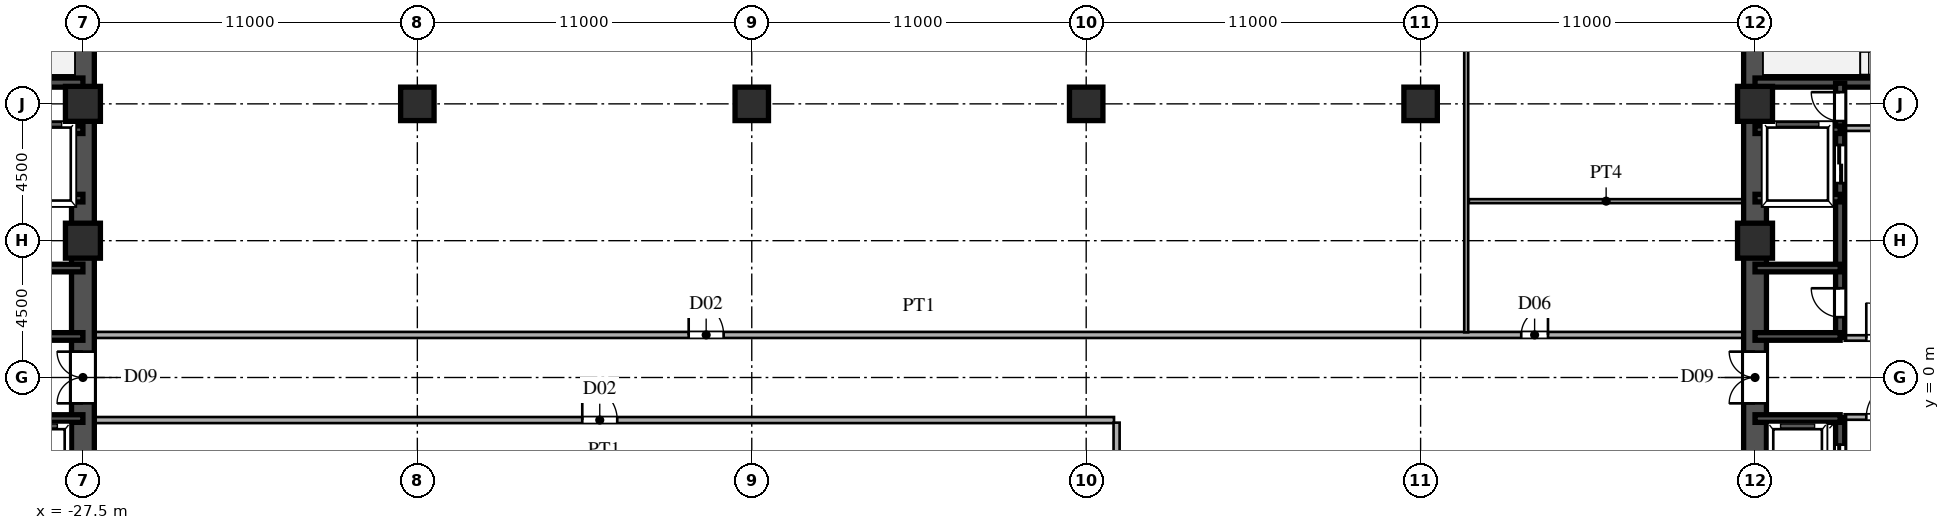
"""IFC4 building model, lengths in metres.
Left out: names, types, materials, properties, quantities, classifications, styles, units other than length and angle.
Written with IfcOpenShell. Run it as: python <this file> out.ifc"""

import sys

from ifc_helpers import new_model, si_unit, direction, frame, frame_2d, origin, origin_2d, place, context, subcontext, project, spatial, rectangle, hollow_rectangle, extrude, source, transform, mapped, element, fill, save


model = new_model("IFC4")
c1 = context("Model", 3, precision=1e-05, world=origin(), true_north=direction((0.0, 1.0)))
c2 = subcontext(c1, "Body", "Model", "MODEL_VIEW")
j1 = project(units=[si_unit("LENGTHUNIT", "METRE"), si_unit("PLANEANGLEUNIT", "RADIAN")], contexts=[c1])
p1 = place(None, origin())
s1 = spatial("IfcSite", under=j1, at=p1, CompositionType="ELEMENT")
p2 = place(p1, origin())
s2 = spatial("IfcBuilding", under=s1, at=p2, CompositionType="ELEMENT")
p3 = place(p2, frame((0.0, 0.0, -4.8)))
s3 = spatial("IfcBuildingStorey", under=s2, at=p3, CompositionType="ELEMENT", Elevation=-4.8)
m1 = source(origin(), c2, "Body", "SweptSolid", [
    extrude(hollow_rectangle(XDim=1.15, YDim=1.15, WallThickness=0.048, at=origin_2d()), origin(), (0.0, 0.0, 1.0), 4.8),
])
for number, where, z_axis, x_axis in (
    (1, (-27.5, 4.5, 0.0), (0.0, 0.0, 1.0), (1.0, 0.0, 0.0)),
    (2, (-27.5, 9.0, 0.0), (0.0, 0.0, 1.0), (1.0, 0.0, 0.0)),
    (3, (27.5, 4.5, 0.0), (0.0, 0.0, 1.0), (1.0, 0.0, 0.0)),
    (4, (27.5, 9.0, 0.0), (0.0, 0.0, 1.0), (1.0, 0.0, 0.0)),
):
    element("IfcColumn", number, at=place(p3, frame(where, z_axis=z_axis, x_axis=x_axis)), inside=s3, PredefinedType="COLUMN", context=c2, shape_type="MappedRepresentation", body=[
        mapped(m1, transform((0.0, 0.0, 0.0), scale=1.0)),
    ])
m2 = source(origin(), c2, "Body", "SweptSolid", [
    extrude(rectangle(XDim=1.1, YDim=1.1, at=origin_2d()), origin(), (0.0, 0.0, 1.0), 4.8),
])
for number, where, z_axis, x_axis in (
    (5, (-16.5, 9.0, 0.0), (0.0, 0.0, 1.0), (1.0, 0.0, 0.0)),
    (6, (-5.5, 9.0, 0.0), (0.0, 0.0, 1.0), (1.0, 0.0, 0.0)),
    (7, (5.5, 9.0, 0.0), (0.0, 0.0, 1.0), (1.0, 0.0, 0.0)),
    (8, (16.5, 9.0, 0.0), (0.0, 0.0, 1.0), (1.0, 0.0, 0.0)),
):
    element("IfcColumn", number, at=place(p3, frame(where, z_axis=z_axis, x_axis=x_axis)), inside=s3, PredefinedType="COLUMN", context=c2, shape_type="MappedRepresentation", body=[
        mapped(m2, transform((0.0, 0.0, 0.0), scale=1.0)),
    ])
for number, where, z_axis, x_axis in (
    (9, (-27.5, -13.5, 0.0), (0.0, 0.0, 1.0), (0.0, 1.0, 0.0)),
    (10, (-27.5, 1.3, 0.0), (0.0, 0.0, 1.0), (0.0, 1.0, 0.0)),
):
    element("IfcWall", number, at=place(p3, frame(where, z_axis=z_axis, x_axis=x_axis)), inside=s3, PredefinedType="SHEAR", context=c2, shape_type="SweptSolid", body=[
        extrude(rectangle(XDim=12.2, YDim=0.75, at=frame_2d((6.1, 0.0))), origin(), (0.0, 0.0, 1.0), 4.52),
    ])
p4 = place(p3, frame((-27.5, -1.3, 0.0), z_axis=(0.0, 0.0, 1.0), x_axis=(0.0, 1.0, 0.0)))
e11 = element("IfcWall", 11, at=p4, inside=s3, PredefinedType="SHEAR", context=c2, shape_type="SweptSolid", body=[
    extrude(rectangle(XDim=2.6, YDim=0.75, at=frame_2d((1.3, 0.0))), origin(), (0.0, 0.0, 1.0), 4.52),
])
p5 = place(p4, frame((0.45, 0.0, 0.0)))
e12 = element("IfcOpeningElement", 12, at=p5, cuts=e11, PredefinedType="OPENING", context=c2, shape_type="SweptSolid", body=[
    extrude(rectangle(XDim=1.7, YDim=2.35, at=frame_2d((0.85, 1.175))), frame((0.0, 0.385, 0.0), z_axis=(0.0, -1.0, 0.0), x_axis=(1.0, 0.0, 0.0)), (0.0, 0.0, 1.0), 0.77),
])
p6 = place(p3, frame((-36.5, 9.7, 0.0), z_axis=(0.0, 0.0, 1.0), x_axis=(1.0, 0.0, 0.0)))
e13 = element("IfcWall", 13, at=p6, inside=s3, PredefinedType="SHEAR", context=c2, shape_type="SweptSolid", body=[
    extrude(rectangle(XDim=9.0, YDim=0.3, at=frame_2d((4.5, 0.0))), origin(), (0.0, 0.0, 1.0), 4.52),
])
p7 = place(p6, frame((0.6, 0.0, 0.0)))
e14 = element("IfcOpeningElement", 14, at=p7, cuts=e13, PredefinedType="OPENING", context=c2, shape_type="SweptSolid", body=[
    extrude(rectangle(XDim=1.1, YDim=2.2, at=frame_2d((0.55, 1.1))), frame((0.0, 0.16, 0.0), z_axis=(0.0, -1.0, 0.0), x_axis=(1.0, 0.0, 0.0)), (0.0, 0.0, 1.0), 0.32),
])
for number, where, z_axis, x_axis in (
    (15, (-30.3, -1.35, 0.0), (0.0, 0.0, 1.0), (1.0, 0.0, 0.0)),
    (16, (-30.3, 1.35, 0.0), (0.0, 0.0, 1.0), (1.0, 0.0, 0.0)),
    (17, (-30.3, 3.6, 0.0), (0.0, 0.0, 1.0), (1.0, 0.0, 0.0)),
    (18, (-30.3, 5.9, 0.0), (0.0, 0.0, 1.0), (1.0, 0.0, 0.0)),
    (19, (-30.3, 8.15, 0.0), (0.0, 0.0, 1.0), (1.0, 0.0, 0.0)),
):
    element("IfcWall", number, at=place(p3, frame(where, z_axis=z_axis, x_axis=x_axis)), inside=s3, PredefinedType="SHEAR", context=c2, shape_type="SweptSolid", body=[
        extrude(rectangle(XDim=2.8, YDim=0.25, at=frame_2d((1.4, 0.0))), origin(), (0.0, 0.0, 1.0), 4.52),
    ])
for number, where, z_axis, x_axis in (
    (20, (27.5, -13.5, 0.0), (0.0, 0.0, 1.0), (0.0, 1.0, 0.0)),
    (21, (27.5, 1.3, 0.0), (0.0, 0.0, 1.0), (0.0, 1.0, 0.0)),
):
    element("IfcWall", number, at=place(p3, frame(where, z_axis=z_axis, x_axis=x_axis)), inside=s3, PredefinedType="SHEAR", context=c2, shape_type="SweptSolid", body=[
        extrude(rectangle(XDim=12.2, YDim=0.75, at=frame_2d((6.1, 0.0))), origin(), (0.0, 0.0, 1.0), 4.52),
    ])
p8 = place(p3, frame((27.5, -1.3, 0.0), z_axis=(0.0, 0.0, 1.0), x_axis=(0.0, 1.0, 0.0)))
e22 = element("IfcWall", 22, at=p8, inside=s3, PredefinedType="SHEAR", context=c2, shape_type="SweptSolid", body=[
    extrude(rectangle(XDim=2.6, YDim=0.75, at=frame_2d((1.3, 0.0))), origin(), (0.0, 0.0, 1.0), 4.52),
])
p9 = place(p8, frame((0.45, 0.0, 0.0)))
e23 = element("IfcOpeningElement", 23, at=p9, cuts=e22, PredefinedType="OPENING", context=c2, shape_type="SweptSolid", body=[
    extrude(rectangle(XDim=1.7, YDim=2.35, at=frame_2d((0.85, 1.175))), frame((0.0, 0.385, 0.0), z_axis=(0.0, -1.0, 0.0), x_axis=(1.0, 0.0, 0.0)), (0.0, 0.0, 1.0), 0.77),
])
p10 = place(p3, frame((27.5, 9.7, 0.0), z_axis=(0.0, 0.0, 1.0), x_axis=(1.0, 0.0, 0.0)))
e24 = element("IfcWall", 24, at=p10, inside=s3, PredefinedType="SHEAR", context=c2, shape_type="SweptSolid", body=[
    extrude(rectangle(XDim=9.0, YDim=0.3, at=frame_2d((4.5, 0.0))), origin(), (0.0, 0.0, 1.0), 4.52),
])
p11 = place(p10, frame((7.3, 0.0, 0.0)))
e25 = element("IfcOpeningElement", 25, at=p11, cuts=e24, PredefinedType="OPENING", context=c2, shape_type="SweptSolid", body=[
    extrude(rectangle(XDim=1.1, YDim=2.2, at=frame_2d((0.55, 1.1))), frame((0.0, 0.16, 0.0), z_axis=(0.0, -1.0, 0.0), x_axis=(1.0, 0.0, 0.0)), (0.0, 0.0, 1.0), 0.32),
])
for number, where, z_axis, x_axis in (
    (26, (27.5, -1.35, 0.0), (0.0, 0.0, 1.0), (1.0, 0.0, 0.0)),
    (27, (27.5, 1.35, 0.0), (0.0, 0.0, 1.0), (1.0, 0.0, 0.0)),
    (28, (27.5, 3.6, 0.0), (0.0, 0.0, 1.0), (1.0, 0.0, 0.0)),
    (29, (27.5, 5.9, 0.0), (0.0, 0.0, 1.0), (1.0, 0.0, 0.0)),
    (30, (27.5, 8.15, 0.0), (0.0, 0.0, 1.0), (1.0, 0.0, 0.0)),
):
    element("IfcWall", number, at=place(p3, frame(where, z_axis=z_axis, x_axis=x_axis)), inside=s3, PredefinedType="SHEAR", context=c2, shape_type="SweptSolid", body=[
        extrude(rectangle(XDim=2.8, YDim=0.25, at=frame_2d((1.4, 0.0))), origin(), (0.0, 0.0, 1.0), 4.52),
    ])
p12 = place(p3, frame((30.3, -4.2, 0.0), z_axis=(0.0, 0.0, 1.0), x_axis=(0.0, 1.0, 0.0)))
e31 = element("IfcWall", 31, at=p12, inside=s3, PredefinedType="SHEAR", context=c2, shape_type="SweptSolid", body=[
    extrude(rectangle(XDim=2.88, YDim=0.3, at=frame_2d((1.44, 0.0))), origin(), (0.0, 0.0, 1.0), 4.52),
])
p13 = place(p12, frame((0.89, 0.0, 0.0)))
e32 = element("IfcOpeningElement", 32, at=p13, cuts=e31, PredefinedType="OPENING", context=c2, shape_type="SweptSolid", body=[
    extrude(rectangle(XDim=1.1, YDim=2.2, at=frame_2d((0.55, 1.1))), frame((0.0, 0.16, 0.0), z_axis=(0.0, -1.0, 0.0), x_axis=(1.0, 0.0, 0.0)), (0.0, 0.0, 1.0), 0.32),
])
p14 = place(p3, frame((30.3, 1.32, 0.0), z_axis=(0.0, 0.0, 1.0), x_axis=(0.0, 1.0, 0.0)))
e33 = element("IfcWall", 33, at=p14, inside=s3, PredefinedType="SHEAR", context=c2, shape_type="SweptSolid", body=[
    extrude(rectangle(XDim=2.28, YDim=0.3, at=frame_2d((1.14, 0.0))), origin(), (0.0, 0.0, 1.0), 4.52),
])
p15 = place(p14, frame((0.665, 0.0, 0.0)))
e34 = element("IfcOpeningElement", 34, at=p15, cuts=e33, PredefinedType="OPENING", context=c2, shape_type="SweptSolid", body=[
    extrude(rectangle(XDim=0.95, YDim=2.15, at=frame_2d((0.475, 1.075))), frame((0.0, 0.16, 0.0), z_axis=(0.0, -1.0, 0.0), x_axis=(1.0, 0.0, 0.0)), (0.0, 0.0, 1.0), 0.32),
])
p16 = place(p3, frame((30.3, 3.6, 0.0), z_axis=(0.0, 0.0, 1.0), x_axis=(0.0, 1.0, 0.0)))
e35 = element("IfcWall", 35, at=p16, inside=s3, PredefinedType="SHEAR", context=c2, shape_type="SweptSolid", body=[
    extrude(rectangle(XDim=2.3, YDim=0.3, at=frame_2d((1.15, 0.0))), origin(), (0.0, 0.0, 1.0), 4.52),
])
p17 = place(p3, frame((30.3, 5.9, 0.0), z_axis=(0.0, 0.0, 1.0), x_axis=(0.0, 1.0, 0.0)))
e36 = element("IfcWall", 36, at=p17, inside=s3, PredefinedType="SHEAR", context=c2, shape_type="SweptSolid", body=[
    extrude(rectangle(XDim=2.25, YDim=0.3, at=frame_2d((1.125, 0.0))), origin(), (0.0, 0.0, 1.0), 4.52),
])
p18 = place(p17, frame((0.495, 0.0, 0.0)))
e37 = element("IfcOpeningElement", 37, at=p18, cuts=e36, PredefinedType="OPENING", context=c2, shape_type="SweptSolid", body=[
    extrude(rectangle(XDim=1.25, YDim=2.3, at=frame_2d((0.625, 1.15))), frame((0.0, 0.16, 0.0), z_axis=(0.0, -1.0, 0.0), x_axis=(1.0, 0.0, 0.0)), (0.0, 0.0, 1.0), 0.32),
])
p19 = place(p3, frame((30.3, 8.15, 0.0), z_axis=(0.0, 0.0, 1.0), x_axis=(0.0, 1.0, 0.0)))
e38 = element("IfcWall", 38, at=p19, inside=s3, PredefinedType="SHEAR", context=c2, shape_type="SweptSolid", body=[
    extrude(rectangle(XDim=1.53, YDim=0.3, at=frame_2d((0.765, 0.0))), origin(), (0.0, 0.0, 1.0), 4.52),
])
p20 = place(p19, frame((0.285, 0.0, 0.0)))
e39 = element("IfcOpeningElement", 39, at=p20, cuts=e38, PredefinedType="OPENING", context=c2, shape_type="SweptSolid", body=[
    extrude(rectangle(XDim=0.95, YDim=2.15, at=frame_2d((0.475, 1.075))), frame((0.0, 0.16, 0.0), z_axis=(0.0, -1.0, 0.0), x_axis=(1.0, 0.0, 0.0)), (0.0, 0.0, 1.0), 0.32),
])
p21 = place(p3, frame((30.45, 8.2, 0.0), z_axis=(0.0, 0.0, 1.0), x_axis=(1.0, 0.0, 0.0)))
e40 = element("IfcWall", 40, at=p21, inside=s3, PredefinedType="PARTITIONING", context=c2, shape_type="SweptSolid", body=[
    extrude(rectangle(XDim=5.7, YDim=0.18, at=frame_2d((2.85, 0.0))), origin(), (0.0, 0.0, 1.0), 4.52),
])
p22 = place(p3, frame((30.45, -1.3, 0.0), z_axis=(0.0, 0.0, 1.0), x_axis=(1.0, 0.0, 0.0)))
e41 = element("IfcWall", 41, at=p22, inside=s3, PredefinedType="PARTITIONING", context=c2, shape_type="SweptSolid", body=[
    extrude(rectangle(XDim=2.57, YDim=0.18, at=frame_2d((1.285, 0.0))), origin(), (0.0, 0.0, 1.0), 4.52),
])
p23 = place(p22, frame((0.71, 0.0, 0.0)))
e42 = element("IfcOpeningElement", 42, at=p23, cuts=e41, PredefinedType="OPENING", context=c2, shape_type="SweptSolid", body=[
    extrude(rectangle(XDim=1.15, YDim=2.2, at=frame_2d((0.575, 1.1))), frame((0.0, 0.1, 0.0), z_axis=(0.0, -1.0, 0.0), x_axis=(1.0, 0.0, 0.0)), (0.0, 0.0, 1.0), 0.2),
])
p24 = place(p3, frame((30.45, 1.3, 0.0), z_axis=(0.0, 0.0, 1.0), x_axis=(1.0, 0.0, 0.0)))
e43 = element("IfcWall", 43, at=p24, inside=s3, PredefinedType="PARTITIONING", context=c2, shape_type="SweptSolid", body=[
    extrude(rectangle(XDim=2.57, YDim=0.18, at=frame_2d((1.285, 0.0))), origin(), (0.0, 0.0, 1.0), 4.52),
])
p25 = place(p24, frame((0.71, 0.0, 0.0)))
e44 = element("IfcOpeningElement", 44, at=p25, cuts=e43, PredefinedType="OPENING", context=c2, shape_type="SweptSolid", body=[
    extrude(rectangle(XDim=1.15, YDim=2.2, at=frame_2d((0.575, 1.1))), frame((0.0, 0.1, 0.0), z_axis=(0.0, -1.0, 0.0), x_axis=(1.0, 0.0, 0.0)), (0.0, 0.0, 1.0), 0.2),
])
p26 = place(p3, frame((-27.12, -1.4, 0.0), z_axis=(0.0, 0.0, 1.0), x_axis=(1.0, 0.0, 0.0)))
e45 = element("IfcWall", 45, at=p26, inside=s3, PredefinedType="PARTITIONING", context=c2, shape_type="SweptSolid", body=[
    extrude(rectangle(XDim=33.535, YDim=0.2, at=frame_2d((16.768, 0.0))), origin(), (0.0, 0.0, 1.0), 4.52),
])
p27 = place(p26, frame((16.045, 0.0, 0.0)))
e46 = element("IfcOpeningElement", 46, at=p27, cuts=e45, PredefinedType="OPENING", context=c2, shape_type="SweptSolid", body=[
    extrude(rectangle(XDim=1.15, YDim=2.2, at=frame_2d((0.575, 1.1))), frame((0.0, 0.11, 0.0), z_axis=(0.0, -1.0, 0.0), x_axis=(1.0, 0.0, 0.0)), (0.0, 0.0, 1.0), 0.22),
])
p28 = place(p3, frame((-27.12, 1.4, 0.0), z_axis=(0.0, 0.0, 1.0), x_axis=(1.0, 0.0, 0.0)))
e47 = element("IfcWall", 47, at=p28, inside=s3, PredefinedType="PARTITIONING", context=c2, shape_type="SweptSolid", body=[
    extrude(rectangle(XDim=54.24, YDim=0.2, at=frame_2d((27.12, 0.0))), origin(), (0.0, 0.0, 1.0), 4.52),
])
p29 = place(p28, frame((19.545, 0.0, 0.0)))
e48 = element("IfcOpeningElement", 48, at=p29, cuts=e47, PredefinedType="OPENING", context=c2, shape_type="SweptSolid", body=[
    extrude(rectangle(XDim=1.15, YDim=2.2, at=frame_2d((0.575, 1.1))), frame((0.0, 0.11, 0.0), z_axis=(0.0, -1.0, 0.0), x_axis=(1.0, 0.0, 0.0)), (0.0, 0.0, 1.0), 0.22),
])
p30 = place(p28, frame((46.93, 0.0, 0.0)))
e49 = element("IfcOpeningElement", 49, at=p30, cuts=e47, PredefinedType="OPENING", context=c2, shape_type="SweptSolid", body=[
    extrude(rectangle(XDim=0.88, YDim=2.1, at=frame_2d((0.44, 1.05))), frame((0.0, 0.11, 0.0), z_axis=(0.0, -1.0, 0.0), x_axis=(1.0, 0.0, 0.0)), (0.0, 0.0, 1.0), 0.22),
])
p31 = place(p3, frame((18.085, 5.8, 0.0), z_axis=(0.0, 0.0, 1.0), x_axis=(1.0, 0.0, 0.0)))
e50 = element("IfcWall", 50, at=p31, inside=s3, PredefinedType="PARTITIONING", context=c2, shape_type="SweptSolid", body=[
    extrude(rectangle(XDim=9.035, YDim=0.13, at=frame_2d((4.518, 0.0))), origin(), (0.0, 0.0, 1.0), 4.52),
])
p32 = place(p3, frame((6.5, -35.795, 0.0), z_axis=(0.0, 0.0, 1.0), x_axis=(0.0, 1.0, 0.0)))
e51 = element("IfcWall", 51, at=p32, inside=s3, PredefinedType="PARTITIONING", context=c2, shape_type="SweptSolid", body=[
    extrude(rectangle(XDim=34.31, YDim=0.2, at=frame_2d((17.155, 0.0))), origin(), (0.0, 0.0, 1.0), 4.52),
])
p33 = place(p3, frame((18.0, 1.485, 0.0), z_axis=(0.0, 0.0, 1.0), x_axis=(0.0, 1.0, 0.0)))
e52 = element("IfcWall", 52, at=p33, inside=s3, PredefinedType="PARTITIONING", context=c2, shape_type="SweptSolid", body=[
    extrude(rectangle(XDim=34.31, YDim=0.13, at=frame_2d((17.155, 0.0))), origin(), (0.0, 0.0, 1.0), 4.52),
])
m3 = source(origin(), c2, "Body", "SweptSolid", [
    extrude(rectangle(XDim=1.7, YDim=2.35, at=frame_2d((0.85, 1.175))), frame((0.0, 0.025, 0.0), z_axis=(0.0, -1.0, 0.0), x_axis=(1.0, 0.0, 0.0)), (0.0, 0.0, 1.0), 0.05),
])
p34 = place(p5, origin())
e53 = element("IfcDoor", 53, at=p34, inside=s3, OperationType="DOUBLE_SWING_LEFT", PredefinedType="DOOR", context=c2, shape_type="MappedRepresentation", body=[
    mapped(m3, transform((0.0, 0.0, 0.0), scale=1.0)),
])
fill(e12, e53)
p35 = place(p9, origin())
e54 = element("IfcDoor", 54, at=p35, inside=s3, OperationType="DOUBLE_SWING_LEFT", PredefinedType="DOOR", context=c2, shape_type="MappedRepresentation", body=[
    mapped(m3, transform((0.0, 0.0, 0.0), scale=1.0)),
])
fill(e23, e54)
m4 = source(origin(), c2, "Body", "SweptSolid", [
    extrude(rectangle(XDim=1.1, YDim=2.2, at=frame_2d((0.55, 1.1))), frame((0.0, 0.025, 0.0), z_axis=(0.0, -1.0, 0.0), x_axis=(1.0, 0.0, 0.0)), (0.0, 0.0, 1.0), 0.05),
])
p36 = place(p13, origin())
e55 = element("IfcDoor", 55, at=p36, inside=s3, OperationType="DOUBLE_DOOR_SLIDING", PredefinedType="DOOR", context=c2, shape_type="MappedRepresentation", body=[
    mapped(m4, transform((0.0, 0.0, 0.0), scale=1.0)),
])
fill(e32, e55)
m5 = source(origin(), c2, "Body", "SweptSolid", [
    extrude(rectangle(XDim=0.95, YDim=2.15, at=frame_2d((0.475, 1.075))), frame((0.0, 0.025, 0.0), z_axis=(0.0, -1.0, 0.0), x_axis=(1.0, 0.0, 0.0)), (0.0, 0.0, 1.0), 0.05),
])
p37 = place(p15, origin())
e56 = element("IfcDoor", 56, at=p37, inside=s3, OperationType="SINGLE_SWING_RIGHT", PredefinedType="DOOR", context=c2, shape_type="MappedRepresentation", body=[
    mapped(m5, transform((0.0, 0.0, 0.0), scale=1.0)),
])
fill(e34, e56)
m6 = source(origin(), c2, "Body", "SweptSolid", [
    extrude(rectangle(XDim=1.25, YDim=2.3, at=frame_2d((0.625, 1.15))), frame((0.0, 0.025, 0.0), z_axis=(0.0, -1.0, 0.0), x_axis=(1.0, 0.0, 0.0)), (0.0, 0.0, 1.0), 0.05),
])
p38 = place(p18, origin())
e57 = element("IfcDoor", 57, at=p38, inside=s3, OperationType="DOUBLE_DOOR_SLIDING", PredefinedType="DOOR", context=c2, shape_type="MappedRepresentation", body=[
    mapped(m6, transform((0.0, 0.0, 0.0), scale=1.0)),
])
fill(e37, e57)
p39 = place(p20, origin())
e58 = element("IfcDoor", 58, at=p39, inside=s3, OperationType="SINGLE_SWING_RIGHT", PredefinedType="DOOR", context=c2, shape_type="MappedRepresentation", body=[
    mapped(m5, transform((0.0, 0.0, 0.0), scale=1.0)),
])
fill(e39, e58)
m7 = source(origin(), c2, "Body", "SweptSolid", [
    extrude(rectangle(XDim=1.15, YDim=2.2, at=frame_2d((0.575, 1.1))), frame((0.0, 0.025, 0.0), z_axis=(0.0, -1.0, 0.0), x_axis=(1.0, 0.0, 0.0)), (0.0, 0.0, 1.0), 0.05),
])
p40 = place(p23, origin())
e59 = element("IfcDoor", 59, at=p40, inside=s3, OperationType="SINGLE_SWING_RIGHT", PredefinedType="DOOR", context=c2, shape_type="MappedRepresentation", body=[
    mapped(m7, transform((0.0, 0.0, 0.0), scale=1.0)),
])
fill(e42, e59)
p41 = place(p25, origin())
e60 = element("IfcDoor", 60, at=p41, inside=s3, OperationType="SINGLE_SWING_LEFT", PredefinedType="DOOR", context=c2, shape_type="MappedRepresentation", body=[
    mapped(m7, transform((0.0, 0.0, 0.0), scale=1.0)),
])
fill(e44, e60)
p42 = place(p27, origin())
e61 = element("IfcDoor", 61, at=p42, inside=s3, OperationType="SINGLE_SWING_LEFT", PredefinedType="DOOR", context=c2, shape_type="MappedRepresentation", body=[
    mapped(m7, transform((0.0, 0.0, 0.0), scale=1.0)),
])
fill(e46, e61)
p43 = place(p29, origin())
e62 = element("IfcDoor", 62, at=p43, inside=s3, OperationType="SINGLE_SWING_LEFT", PredefinedType="DOOR", context=c2, shape_type="MappedRepresentation", body=[
    mapped(m7, transform((0.0, 0.0, 0.0), scale=1.0)),
])
fill(e48, e62)
m8 = source(origin(), c2, "Body", "SweptSolid", [
    extrude(rectangle(XDim=0.88, YDim=2.1, at=frame_2d((0.44, 1.05))), frame((0.0, 0.025, 0.0), z_axis=(0.0, -1.0, 0.0), x_axis=(1.0, 0.0, 0.0)), (0.0, 0.0, 1.0), 0.05),
])
p44 = place(p30, origin())
e63 = element("IfcDoor", 63, at=p44, inside=s3, OperationType="SINGLE_SWING_RIGHT", PredefinedType="DOOR", context=c2, shape_type="MappedRepresentation", body=[
    mapped(m8, transform((0.0, 0.0, 0.0), scale=1.0)),
])
fill(e49, e63)
save(model, sys.argv[1])
